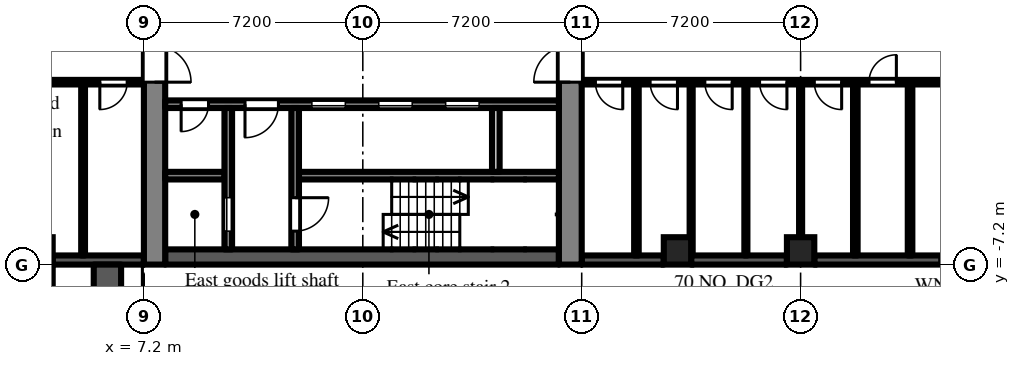
"""IFC4 building model, lengths in metres.
Left out: names, types, materials, properties, quantities, classifications, styles, units other than length and angle.
Written with IfcOpenShell. Run it as: python <this file> out.ifc"""

import sys

from ifc_helpers import new_model, si_unit, direction, frame, frame_2d, origin, origin_2d, place, context, subcontext, project, spatial, rectangle, extrude, element, fill, save


model = new_model("IFC4")
c1 = context("Model", 3, precision=1e-05, world=origin(), true_north=direction((0.0, 1.0)))
c2 = subcontext(c1, "Body", "Model", "MODEL_VIEW")
j1 = project(units=[si_unit("LENGTHUNIT", "METRE"), si_unit("PLANEANGLEUNIT", "RADIAN")], contexts=[c1])
p1 = place(None, origin())
s1 = spatial("IfcSite", under=j1, at=p1, CompositionType="ELEMENT")
p2 = place(p1, origin())
s2 = spatial("IfcBuilding", under=s1, at=p2, CompositionType="ELEMENT")
p3 = place(p2, frame((0.0, 0.0, 20.7)))
s3 = spatial("IfcBuildingStorey", under=s2, at=p3, CompositionType="ELEMENT", Elevation=20.7)
for number, where, z_axis, x_axis in (
    (1, (24.75, -6.75, 0.0), (0.0, 0.0, 1.0), (1.0, 0.0, 0.0)),
    (2, (28.8, -6.75, 0.0), (0.0, 0.0, 1.0), (1.0, 0.0, 0.0)),
):
    element("IfcColumn", number, at=place(p3, frame(where, z_axis=z_axis, x_axis=x_axis)), inside=s3, PredefinedType="COLUMN", context=c2, shape_type="SweptSolid", body=[
        extrude(rectangle(XDim=0.9, YDim=0.9, at=origin_2d()), origin(), (0.0, 0.0, 1.0), 3.0),
    ])
p4 = place(p3, frame((21.6, -7.05, 0.0), z_axis=(0.0, 0.0, 1.0), x_axis=(1.0, 0.0, 0.0)))
e3 = element("IfcWall", 3, at=p4, inside=s3, PredefinedType="SOLIDWALL", context=c2, shape_type="SweptSolid", body=[
    extrude(rectangle(XDim=2.7, YDim=0.3, at=frame_2d((1.35, 0.0))), origin(), (0.0, 0.0, 1.0), 2.1),
])
p5 = place(p3, frame((25.2, -7.05, 0.0), z_axis=(0.0, 0.0, 1.0), x_axis=(1.0, 0.0, 0.0)))
e4 = element("IfcWall", 4, at=p5, inside=s3, PredefinedType="SOLIDWALL", context=c2, shape_type="SweptSolid", body=[
    extrude(rectangle(XDim=3.15, YDim=0.3, at=frame_2d((1.575, 0.0))), origin(), (0.0, 0.0, 1.0), 2.1),
])
p6 = place(p3, frame((29.25, -7.05, 0.0), z_axis=(0.0, 0.0, 1.0), x_axis=(1.0, 0.0, 0.0)))
e5 = element("IfcWall", 5, at=p6, inside=s3, PredefinedType="SOLIDWALL", context=c2, shape_type="SweptSolid", body=[
    extrude(rectangle(XDim=6.3, YDim=0.3, at=frame_2d((3.15, 0.0))), origin(), (0.0, 0.0, 1.0), 2.1),
])
p7 = place(p6, frame((4.125, 0.0, 0.2)))
e6 = element("IfcOpeningElement", 6, at=p7, cuts=e5, PredefinedType="OPENING", context=c2, shape_type="SweptSolid", body=[
    extrude(rectangle(XDim=1.2, YDim=1.85, at=frame_2d((0.6, 0.925))), frame((0.0, 0.16, 0.0), z_axis=(0.0, -1.0, 0.0), x_axis=(1.0, 0.0, 0.0)), (0.0, 0.0, 1.0), 0.32),
])
p8 = place(p3, frame((4.05, -14.4, 0.0), z_axis=(0.0, 0.0, 1.0), x_axis=(0.0, 1.0, 0.0)))
e7 = element("IfcWall", 7, at=p8, inside=s3, PredefinedType="SOLIDWALL", context=c2, shape_type="SweptSolid", body=[
    extrude(rectangle(XDim=7.2, YDim=0.3, at=frame_2d((3.6, 0.0))), origin(), (0.0, 0.0, 1.0), 2.1),
])
p9 = place(p8, frame((3.0, 0.0, 0.0)))
e8 = element("IfcOpeningElement", 8, at=p9, cuts=e7, PredefinedType="OPENING", context=c2, shape_type="SweptSolid", body=[
    extrude(rectangle(XDim=1.2, YDim=2.05, at=frame_2d((0.6, 1.025))), frame((0.0, 0.16, 0.0), z_axis=(0.0, -1.0, 0.0), x_axis=(1.0, 0.0, 0.0)), (0.0, 0.0, 1.0), 0.32),
])
p10 = place(p8, frame((0.9, 0.0, 0.2)))
e9 = element("IfcOpeningElement", 9, at=p10, cuts=e7, PredefinedType="OPENING", context=c2, shape_type="SweptSolid", body=[
    extrude(rectangle(XDim=1.8, YDim=1.85, at=frame_2d((0.9, 0.925))), frame((0.0, 0.16, 0.0), z_axis=(0.0, -1.0, 0.0), x_axis=(1.0, 0.0, 0.0)), (0.0, 0.0, 1.0), 0.32),
])
p11 = place(p8, frame((4.5, 0.0, 0.2)))
e10 = element("IfcOpeningElement", 10, at=p11, cuts=e7, PredefinedType="OPENING", context=c2, shape_type="SweptSolid", body=[
    extrude(rectangle(XDim=1.8, YDim=1.85, at=frame_2d((0.9, 0.925))), frame((0.0, 0.16, 0.0), z_axis=(0.0, -1.0, 0.0), x_axis=(1.0, 0.0, 0.0)), (0.0, 0.0, 1.0), 0.32),
])
p12 = place(p3, frame((4.2, -7.05, 0.0), z_axis=(0.0, 0.0, 1.0), x_axis=(1.0, 0.0, 0.0)))
e11 = element("IfcWall", 11, at=p12, inside=s3, PredefinedType="SOLIDWALL", context=c2, shape_type="SweptSolid", body=[
    extrude(rectangle(XDim=3.0, YDim=0.3, at=frame_2d((1.5, 0.0))), origin(), (0.0, 0.0, 1.0), 2.1),
])
p13 = place(p3, frame((6.0, -14.4, 0.0), z_axis=(0.0, 0.0, 1.0), x_axis=(0.0, 1.0, 0.0)))
e12 = element("IfcWall", 12, at=p13, inside=s3, PredefinedType="PARAPET", context=c2, shape_type="SweptSolid", body=[
    extrude(rectangle(XDim=7.2, YDim=0.9, at=frame_2d((3.6, 0.0))), origin(), (0.0, 0.0, 1.0), 0.8),
])
p14 = place(p3, frame((7.55, -7.2, 0.0), z_axis=(0.0, 0.0, 1.0), x_axis=(0.0, 1.0, 0.0)))
e13 = element("IfcWall", 13, at=p14, inside=s3, PredefinedType="SHEAR", context=c2, shape_type="SweptSolid", body=[
    extrude(rectangle(XDim=14.4, YDim=0.7, at=frame_2d((7.2, 0.0))), origin(), (0.0, 0.0, 1.0), 2.575),
])
p15 = place(p14, frame((6.0, 0.0, 0.0)))
e14 = element("IfcOpeningElement", 14, at=p15, cuts=e13, PredefinedType="OPENING", context=c2, shape_type="SweptSolid", body=[
    extrude(rectangle(XDim=2.4, YDim=2.2, at=frame_2d((1.2, 1.1))), frame((0.0, 0.36, 0.0), z_axis=(0.0, -1.0, 0.0), x_axis=(1.0, 0.0, 0.0)), (0.0, 0.0, 1.0), 0.72),
])
p16 = place(p3, frame((21.225, -7.2, 0.0), z_axis=(0.0, 0.0, 1.0), x_axis=(0.0, 1.0, 0.0)))
e15 = element("IfcWall", 15, at=p16, inside=s3, PredefinedType="SHEAR", context=c2, shape_type="SweptSolid", body=[
    extrude(rectangle(XDim=14.4, YDim=0.75, at=frame_2d((7.2, 0.0))), origin(), (0.0, 0.0, 1.0), 2.575),
])
p17 = place(p16, frame((6.0, 0.0, 0.0)))
e16 = element("IfcOpeningElement", 16, at=p17, cuts=e15, PredefinedType="OPENING", context=c2, shape_type="SweptSolid", body=[
    extrude(rectangle(XDim=2.4, YDim=2.2, at=frame_2d((1.2, 1.1))), frame((0.0, 0.385, 0.0), z_axis=(0.0, -1.0, 0.0), x_axis=(1.0, 0.0, 0.0)), (0.0, 0.0, 1.0), 0.77),
])
p18 = place(p3, frame((7.9, -6.95, 0.0), z_axis=(0.0, 0.0, 1.0), x_axis=(1.0, 0.0, 0.0)))
e17 = element("IfcWall", 17, at=p18, inside=s3, PredefinedType="SHEAR", context=c2, shape_type="SweptSolid", body=[
    extrude(rectangle(XDim=12.95, YDim=0.5, at=frame_2d((6.475, 0.0))), origin(), (0.0, 0.0, 1.0), 2.575),
])
p19 = place(p3, frame((7.9, -1.925, 0.0), z_axis=(0.0, 0.0, 1.0), x_axis=(1.0, 0.0, 0.0)))
e18 = element("IfcWall", 18, at=p19, inside=s3, PredefinedType="SHEAR", context=c2, shape_type="SweptSolid", body=[
    extrude(rectangle(XDim=12.95, YDim=0.25, at=frame_2d((6.475, 0.0))), origin(), (0.0, 0.0, 1.0), 2.575),
])
p20 = place(p19, frame((4.825, 0.0, 0.0)))
e19 = element("IfcOpeningElement", 19, at=p20, cuts=e18, PredefinedType="OPENING", context=c2, shape_type="SweptSolid", body=[
    extrude(rectangle(XDim=1.1, YDim=2.1, at=frame_2d((0.55, 1.05))), frame((0.0, 0.135, 0.0), z_axis=(0.0, -1.0, 0.0), x_axis=(1.0, 0.0, 0.0)), (0.0, 0.0, 1.0), 0.27),
])
p21 = place(p19, frame((7.025, 0.0, 0.0)))
e20 = element("IfcOpeningElement", 20, at=p21, cuts=e18, PredefinedType="OPENING", context=c2, shape_type="SweptSolid", body=[
    extrude(rectangle(XDim=1.1, YDim=2.1, at=frame_2d((0.55, 1.05))), frame((0.0, 0.135, 0.0), z_axis=(0.0, -1.0, 0.0), x_axis=(1.0, 0.0, 0.0)), (0.0, 0.0, 1.0), 0.27),
])
p22 = place(p19, frame((9.225, 0.0, 0.0)))
e21 = element("IfcOpeningElement", 21, at=p22, cuts=e18, PredefinedType="OPENING", context=c2, shape_type="SweptSolid", body=[
    extrude(rectangle(XDim=1.1, YDim=2.1, at=frame_2d((0.55, 1.05))), frame((0.0, 0.135, 0.0), z_axis=(0.0, -1.0, 0.0), x_axis=(1.0, 0.0, 0.0)), (0.0, 0.0, 1.0), 0.27),
])
p23 = place(p19, frame((0.525, 0.0, 0.0)))
e22 = element("IfcOpeningElement", 22, at=p23, cuts=e18, PredefinedType="OPENING", context=c2, shape_type="SweptSolid", body=[
    extrude(rectangle(XDim=0.9, YDim=2.1, at=frame_2d((0.45, 1.05))), frame((0.0, 0.135, 0.0), z_axis=(0.0, -1.0, 0.0), x_axis=(1.0, 0.0, 0.0)), (0.0, 0.0, 1.0), 0.27),
])
p24 = place(p19, frame((2.625, 0.0, 0.0)))
e23 = element("IfcOpeningElement", 23, at=p24, cuts=e18, PredefinedType="OPENING", context=c2, shape_type="SweptSolid", body=[
    extrude(rectangle(XDim=1.1, YDim=2.1, at=frame_2d((0.55, 1.05))), frame((0.0, 0.135, 0.0), z_axis=(0.0, -1.0, 0.0), x_axis=(1.0, 0.0, 0.0)), (0.0, 0.0, 1.0), 0.27),
])
p25 = place(p3, frame((7.9, -4.275, 0.0), z_axis=(0.0, 0.0, 1.0), x_axis=(1.0, 0.0, 0.0)))
e24 = element("IfcWall", 24, at=p25, inside=s3, PredefinedType="SHEAR", context=c2, shape_type="SweptSolid", body=[
    extrude(rectangle(XDim=1.95, YDim=0.25, at=frame_2d((0.975, 0.0))), origin(), (0.0, 0.0, 1.0), 2.575),
])
p26 = place(p3, frame((12.3, -4.275, 0.0), z_axis=(0.0, 0.0, 1.0), x_axis=(1.0, 0.0, 0.0)))
e25 = element("IfcWall", 25, at=p26, inside=s3, PredefinedType="SHEAR", context=c2, shape_type="SweptSolid", body=[
    extrude(rectangle(XDim=8.55, YDim=0.25, at=frame_2d((4.275, 0.0))), origin(), (0.0, 0.0, 1.0), 2.575),
])
p27 = place(p3, frame((9.975, -2.05, 0.0), z_axis=(0.0, 0.0, 1.0), x_axis=(0.0, -1.0, 0.0)))
e26 = element("IfcWall", 26, at=p27, inside=s3, PredefinedType="SHEAR", context=c2, shape_type="SweptSolid", body=[
    extrude(rectangle(XDim=4.65, YDim=0.25, at=frame_2d((2.325, 0.0))), origin(), (0.0, 0.0, 1.0), 2.575),
])
p28 = place(p27, frame((2.95, 0.0, 0.0)))
e27 = element("IfcOpeningElement", 27, at=p28, cuts=e26, PredefinedType="OPENING", context=c2, shape_type="SweptSolid", body=[
    extrude(rectangle(XDim=1.1, YDim=2.1, at=frame_2d((0.55, 1.05))), frame((0.0, 0.135, 0.0), z_axis=(0.0, -1.0, 0.0), x_axis=(1.0, 0.0, 0.0)), (0.0, 0.0, 1.0), 0.27),
])
p29 = place(p3, frame((12.175, -2.05, 0.0), z_axis=(0.0, 0.0, 1.0), x_axis=(0.0, -1.0, 0.0)))
e28 = element("IfcWall", 28, at=p29, inside=s3, PredefinedType="SHEAR", context=c2, shape_type="SweptSolid", body=[
    extrude(rectangle(XDim=4.65, YDim=0.25, at=frame_2d((2.325, 0.0))), origin(), (0.0, 0.0, 1.0), 2.575),
])
p30 = place(p29, frame((2.95, 0.0, 0.0)))
e29 = element("IfcOpeningElement", 29, at=p30, cuts=e28, PredefinedType="OPENING", context=c2, shape_type="SweptSolid", body=[
    extrude(rectangle(XDim=1.1, YDim=2.1, at=frame_2d((0.55, 1.05))), frame((0.0, 0.135, 0.0), z_axis=(0.0, -1.0, 0.0), x_axis=(1.0, 0.0, 0.0)), (0.0, 0.0, 1.0), 0.27),
])
p31 = place(p3, frame((18.775, -2.05, 0.0), z_axis=(0.0, 0.0, 1.0), x_axis=(0.0, -1.0, 0.0)))
e30 = element("IfcWall", 30, at=p31, inside=s3, PredefinedType="PARTITIONING", context=c2, shape_type="SweptSolid", body=[
    extrude(rectangle(XDim=2.1, YDim=0.25, at=frame_2d((1.05, 0.0))), origin(), (0.0, 0.0, 1.0), 2.575),
])
p32 = place(p3, frame((1.275, -1.2, 0.0), z_axis=(0.0, 0.0, 1.0), x_axis=(1.0, 0.0, 0.0)))
e31 = element("IfcWall", 31, at=p32, inside=s3, PredefinedType="PARTITIONING", context=c2, shape_type="SweptSolid", body=[
    extrude(rectangle(XDim=5.925, YDim=0.15, at=frame_2d((2.962, 0.0))), origin(), (0.0, 0.0, 1.0), 2.575),
])
p33 = place(p32, frame((4.475, 0.0, 0.0)))
e32 = element("IfcOpeningElement", 32, at=p33, cuts=e31, PredefinedType="OPENING", context=c2, shape_type="SweptSolid", body=[
    extrude(rectangle(XDim=0.9, YDim=2.1, at=frame_2d((0.45, 1.05))), frame((0.0, 0.085, 0.0), z_axis=(0.0, -1.0, 0.0), x_axis=(1.0, 0.0, 0.0)), (0.0, 0.0, 1.0), 0.17),
])
p34 = place(p3, frame((5.2, -6.9, 0.0), z_axis=(0.0, 0.0, 1.0), x_axis=(0.0, 1.0, 0.0)))
e33 = element("IfcWall", 33, at=p34, inside=s3, PredefinedType="PARTITIONING", context=c2, shape_type="SweptSolid", body=[
    extrude(rectangle(XDim=5.625, YDim=0.125, at=frame_2d((2.812, 0.0))), origin(), (0.0, 0.0, 1.0), 2.575),
])
p35 = place(p3, frame((21.6, -1.2, 0.0), z_axis=(0.0, 0.0, 1.0), x_axis=(1.0, 0.0, 0.0)))
e34 = element("IfcWall", 34, at=p35, inside=s3, PredefinedType="PARTITIONING", context=c2, shape_type="SweptSolid", body=[
    extrude(rectangle(XDim=14.9, YDim=0.15, at=frame_2d((7.45, 0.0))), origin(), (0.0, 0.0, 1.0), 2.575),
])
p36 = place(p35, frame((0.45, 0.0, 0.0)))
e35 = element("IfcOpeningElement", 35, at=p36, cuts=e34, PredefinedType="OPENING", context=c2, shape_type="SweptSolid", body=[
    extrude(rectangle(XDim=0.9, YDim=2.1, at=frame_2d((0.45, 1.05))), frame((0.0, 0.085, 0.0), z_axis=(0.0, -1.0, 0.0), x_axis=(1.0, 0.0, 0.0)), (0.0, 0.0, 1.0), 0.17),
])
p37 = place(p35, frame((2.25, 0.0, 0.0)))
e36 = element("IfcOpeningElement", 36, at=p37, cuts=e34, PredefinedType="OPENING", context=c2, shape_type="SweptSolid", body=[
    extrude(rectangle(XDim=0.9, YDim=2.1, at=frame_2d((0.45, 1.05))), frame((0.0, 0.085, 0.0), z_axis=(0.0, -1.0, 0.0), x_axis=(1.0, 0.0, 0.0)), (0.0, 0.0, 1.0), 0.17),
])
p38 = place(p35, frame((4.05, 0.0, 0.0)))
e37 = element("IfcOpeningElement", 37, at=p38, cuts=e34, PredefinedType="OPENING", context=c2, shape_type="SweptSolid", body=[
    extrude(rectangle(XDim=0.9, YDim=2.1, at=frame_2d((0.45, 1.05))), frame((0.0, 0.085, 0.0), z_axis=(0.0, -1.0, 0.0), x_axis=(1.0, 0.0, 0.0)), (0.0, 0.0, 1.0), 0.17),
])
p39 = place(p35, frame((5.85, 0.0, 0.0)))
e38 = element("IfcOpeningElement", 38, at=p39, cuts=e34, PredefinedType="OPENING", context=c2, shape_type="SweptSolid", body=[
    extrude(rectangle(XDim=0.9, YDim=2.1, at=frame_2d((0.45, 1.05))), frame((0.0, 0.085, 0.0), z_axis=(0.0, -1.0, 0.0), x_axis=(1.0, 0.0, 0.0)), (0.0, 0.0, 1.0), 0.17),
])
p40 = place(p35, frame((7.65, 0.0, 0.0)))
e39 = element("IfcOpeningElement", 39, at=p40, cuts=e34, PredefinedType="OPENING", context=c2, shape_type="SweptSolid", body=[
    extrude(rectangle(XDim=0.9, YDim=2.1, at=frame_2d((0.45, 1.05))), frame((0.0, 0.085, 0.0), z_axis=(0.0, -1.0, 0.0), x_axis=(1.0, 0.0, 0.0)), (0.0, 0.0, 1.0), 0.17),
])
p41 = place(p35, frame((9.45, 0.0, 0.0)))
e40 = element("IfcOpeningElement", 40, at=p41, cuts=e34, PredefinedType="OPENING", context=c2, shape_type="SweptSolid", body=[
    extrude(rectangle(XDim=0.9, YDim=2.1, at=frame_2d((0.45, 1.05))), frame((0.0, 0.085, 0.0), z_axis=(0.0, -1.0, 0.0), x_axis=(1.0, 0.0, 0.0)), (0.0, 0.0, 1.0), 0.17),
])
p42 = place(p35, frame((11.95, 0.0, 0.0)))
e41 = element("IfcOpeningElement", 41, at=p42, cuts=e34, PredefinedType="OPENING", context=c2, shape_type="SweptSolid", body=[
    extrude(rectangle(XDim=1.8, YDim=2.1, at=frame_2d((0.9, 1.05))), frame((0.0, 0.085, 0.0), z_axis=(0.0, -1.0, 0.0), x_axis=(1.0, 0.0, 0.0)), (0.0, 0.0, 1.0), 0.17),
])
p43 = place(p3, frame((23.4, -6.9, 0.0), z_axis=(0.0, 0.0, 1.0), x_axis=(0.0, 1.0, 0.0)))
e42 = element("IfcWall", 42, at=p43, inside=s3, PredefinedType="PARTITIONING", context=c2, shape_type="SweptSolid", body=[
    extrude(rectangle(XDim=5.625, YDim=0.15, at=frame_2d((2.812, 0.0))), origin(), (0.0, 0.0, 1.0), 2.575),
])
for number, where, z_axis, x_axis in (
    (43, (25.2, -6.9, 0.0), (0.0, 0.0, 1.0), (0.0, 1.0, 0.0)),
    (44, (27.0, -6.9, 0.0), (0.0, 0.0, 1.0), (0.0, 1.0, 0.0)),
    (45, (28.8, -6.9, 0.0), (0.0, 0.0, 1.0), (0.0, 1.0, 0.0)),
):
    element("IfcWall", number, at=place(p3, frame(where, z_axis=z_axis, x_axis=x_axis)), inside=s3, PredefinedType="PARTITIONING", context=c2, shape_type="SweptSolid", body=[
        extrude(rectangle(XDim=5.625, YDim=0.1, at=frame_2d((2.812, 0.0))), origin(), (0.0, 0.0, 1.0), 2.575),
    ])
for number, where, z_axis, x_axis in (
    (46, (30.6, -6.9, 0.0), (0.0, 0.0, 1.0), (0.0, 1.0, 0.0)),
    (47, (32.4, -6.9, 0.0), (0.0, 0.0, 1.0), (0.0, 1.0, 0.0)),
):
    element("IfcWall", number, at=place(p3, frame(where, z_axis=z_axis, x_axis=x_axis)), inside=s3, PredefinedType="PARTITIONING", context=c2, shape_type="SweptSolid", body=[
        extrude(rectangle(XDim=5.625, YDim=0.15, at=frame_2d((2.812, 0.0))), origin(), (0.0, 0.0, 1.0), 2.575),
    ])
p44 = place(p7, origin())
e48 = element("IfcWindow", 48, at=p44, inside=s3, PartitioningType="SINGLE_PANEL", PredefinedType="WINDOW", context=c2, shape_type="SweptSolid", body=[
    extrude(rectangle(XDim=1.2, YDim=1.85, at=frame_2d((0.6, 0.925))), frame((0.0, 0.03, 0.0), z_axis=(0.0, -1.0, 0.0), x_axis=(1.0, 0.0, 0.0)), (0.0, 0.0, 1.0), 0.06),
])
fill(e6, e48)
p45 = place(p20, origin())
e49 = element("IfcDoor", 49, at=p45, inside=s3, OperationType="SLIDING_TO_LEFT", PredefinedType="DOOR", context=c2, shape_type="SweptSolid", body=[
    extrude(rectangle(XDim=1.1, YDim=2.1, at=frame_2d((0.55, 1.05))), frame((0.0, 0.025, 0.0), z_axis=(0.0, -1.0, 0.0), x_axis=(1.0, 0.0, 0.0)), (0.0, 0.0, 1.0), 0.05),
])
fill(e19, e49)
p46 = place(p21, origin())
e50 = element("IfcDoor", 50, at=p46, inside=s3, OperationType="SLIDING_TO_LEFT", PredefinedType="DOOR", context=c2, shape_type="SweptSolid", body=[
    extrude(rectangle(XDim=1.1, YDim=2.1, at=frame_2d((0.55, 1.05))), frame((0.0, 0.025, 0.0), z_axis=(0.0, -1.0, 0.0), x_axis=(1.0, 0.0, 0.0)), (0.0, 0.0, 1.0), 0.05),
])
fill(e20, e50)
p47 = place(p22, origin())
e51 = element("IfcDoor", 51, at=p47, inside=s3, OperationType="SLIDING_TO_LEFT", PredefinedType="DOOR", context=c2, shape_type="SweptSolid", body=[
    extrude(rectangle(XDim=1.1, YDim=2.1, at=frame_2d((0.55, 1.05))), frame((0.0, 0.025, 0.0), z_axis=(0.0, -1.0, 0.0), x_axis=(1.0, 0.0, 0.0)), (0.0, 0.0, 1.0), 0.05),
])
fill(e21, e51)
p48 = place(p28, origin())
e52 = element("IfcDoor", 52, at=p48, inside=s3, OperationType="SLIDING_TO_LEFT", PredefinedType="DOOR", context=c2, shape_type="SweptSolid", body=[
    extrude(rectangle(XDim=1.1, YDim=2.1, at=frame_2d((0.55, 1.05))), frame((0.0, 0.025, 0.0), z_axis=(0.0, -1.0, 0.0), x_axis=(1.0, 0.0, 0.0)), (0.0, 0.0, 1.0), 0.05),
])
fill(e27, e52)
p49 = place(p30, origin())
e53 = element("IfcDoor", 53, at=p49, inside=s3, OperationType="SINGLE_SWING_LEFT", PredefinedType="DOOR", context=c2, shape_type="SweptSolid", body=[
    extrude(rectangle(XDim=1.1, YDim=2.1, at=frame_2d((0.55, 1.05))), frame((0.0, 0.025, 0.0), z_axis=(0.0, -1.0, 0.0), x_axis=(1.0, 0.0, 0.0)), (0.0, 0.0, 1.0), 0.05),
])
fill(e29, e53)
p50 = place(p23, frame((0.9, 0.0, 0.0), z_axis=(0.0, 0.0, 1.0), x_axis=(-1.0, 0.0, 0.0)))
e54 = element("IfcDoor", 54, at=p50, inside=s3, OperationType="SINGLE_SWING_RIGHT", PredefinedType="DOOR", context=c2, shape_type="SweptSolid", body=[
    extrude(rectangle(XDim=0.9, YDim=2.1, at=frame_2d((0.45, 1.05))), frame((0.0, 0.025, 0.0), z_axis=(0.0, -1.0, 0.0), x_axis=(1.0, 0.0, 0.0)), (0.0, 0.0, 1.0), 0.05),
])
fill(e22, e54)
p51 = place(p24, frame((1.1, 0.0, 0.0), z_axis=(0.0, 0.0, 1.0), x_axis=(-1.0, 0.0, 0.0)))
e55 = element("IfcDoor", 55, at=p51, inside=s3, OperationType="SINGLE_SWING_RIGHT", PredefinedType="DOOR", context=c2, shape_type="SweptSolid", body=[
    extrude(rectangle(XDim=1.1, YDim=2.1, at=frame_2d((0.55, 1.05))), frame((0.0, 0.025, 0.0), z_axis=(0.0, -1.0, 0.0), x_axis=(1.0, 0.0, 0.0)), (0.0, 0.0, 1.0), 0.05),
])
fill(e23, e55)
p52 = place(p15, frame((2.4, 0.0, 0.0), z_axis=(0.0, 0.0, 1.0), x_axis=(-1.0, 0.0, 0.0)))
e56 = element("IfcDoor", 56, at=p52, inside=s3, OperationType="DOUBLE_DOOR_DOUBLE_SWING", PredefinedType="DOOR", context=c2, shape_type="SweptSolid", body=[
    extrude(rectangle(XDim=2.4, YDim=2.2, at=frame_2d((1.2, 1.1))), frame((0.0, 0.025, 0.0), z_axis=(0.0, -1.0, 0.0), x_axis=(1.0, 0.0, 0.0)), (0.0, 0.0, 1.0), 0.05),
])
fill(e14, e56)
p53 = place(p17, origin())
e57 = element("IfcDoor", 57, at=p53, inside=s3, OperationType="DOUBLE_DOOR_DOUBLE_SWING", PredefinedType="DOOR", context=c2, shape_type="SweptSolid", body=[
    extrude(rectangle(XDim=2.4, YDim=2.2, at=frame_2d((1.2, 1.1))), frame((0.0, 0.025, 0.0), z_axis=(0.0, -1.0, 0.0), x_axis=(1.0, 0.0, 0.0)), (0.0, 0.0, 1.0), 0.05),
])
fill(e16, e57)
p54 = place(p33, frame((0.9, 0.0, 0.0), z_axis=(0.0, 0.0, 1.0), x_axis=(-1.0, 0.0, 0.0)))
e58 = element("IfcDoor", 58, at=p54, inside=s3, OperationType="SINGLE_SWING_RIGHT", PredefinedType="DOOR", context=c2, shape_type="SweptSolid", body=[
    extrude(rectangle(XDim=0.9, YDim=2.1, at=frame_2d((0.45, 1.05))), frame((0.0, 0.025, 0.0), z_axis=(0.0, -1.0, 0.0), x_axis=(1.0, 0.0, 0.0)), (0.0, 0.0, 1.0), 0.05),
])
fill(e32, e58)
p55 = place(p36, frame((0.9, 0.0, 0.0), z_axis=(0.0, 0.0, 1.0), x_axis=(-1.0, 0.0, 0.0)))
e59 = element("IfcDoor", 59, at=p55, inside=s3, OperationType="SINGLE_SWING_LEFT", PredefinedType="DOOR", context=c2, shape_type="SweptSolid", body=[
    extrude(rectangle(XDim=0.9, YDim=2.1, at=frame_2d((0.45, 1.05))), frame((0.0, 0.025, 0.0), z_axis=(0.0, -1.0, 0.0), x_axis=(1.0, 0.0, 0.0)), (0.0, 0.0, 1.0), 0.05),
])
fill(e35, e59)
p56 = place(p37, frame((0.9, 0.0, 0.0), z_axis=(0.0, 0.0, 1.0), x_axis=(-1.0, 0.0, 0.0)))
e60 = element("IfcDoor", 60, at=p56, inside=s3, OperationType="SINGLE_SWING_LEFT", PredefinedType="DOOR", context=c2, shape_type="SweptSolid", body=[
    extrude(rectangle(XDim=0.9, YDim=2.1, at=frame_2d((0.45, 1.05))), frame((0.0, 0.025, 0.0), z_axis=(0.0, -1.0, 0.0), x_axis=(1.0, 0.0, 0.0)), (0.0, 0.0, 1.0), 0.05),
])
fill(e36, e60)
p57 = place(p38, frame((0.9, 0.0, 0.0), z_axis=(0.0, 0.0, 1.0), x_axis=(-1.0, 0.0, 0.0)))
e61 = element("IfcDoor", 61, at=p57, inside=s3, OperationType="SINGLE_SWING_LEFT", PredefinedType="DOOR", context=c2, shape_type="SweptSolid", body=[
    extrude(rectangle(XDim=0.9, YDim=2.1, at=frame_2d((0.45, 1.05))), frame((0.0, 0.025, 0.0), z_axis=(0.0, -1.0, 0.0), x_axis=(1.0, 0.0, 0.0)), (0.0, 0.0, 1.0), 0.05),
])
fill(e37, e61)
p58 = place(p39, frame((0.9, 0.0, 0.0), z_axis=(0.0, 0.0, 1.0), x_axis=(-1.0, 0.0, 0.0)))
e62 = element("IfcDoor", 62, at=p58, inside=s3, OperationType="SINGLE_SWING_LEFT", PredefinedType="DOOR", context=c2, shape_type="SweptSolid", body=[
    extrude(rectangle(XDim=0.9, YDim=2.1, at=frame_2d((0.45, 1.05))), frame((0.0, 0.025, 0.0), z_axis=(0.0, -1.0, 0.0), x_axis=(1.0, 0.0, 0.0)), (0.0, 0.0, 1.0), 0.05),
])
fill(e38, e62)
p59 = place(p40, frame((0.9, 0.0, 0.0), z_axis=(0.0, 0.0, 1.0), x_axis=(-1.0, 0.0, 0.0)))
e63 = element("IfcDoor", 63, at=p59, inside=s3, OperationType="SINGLE_SWING_LEFT", PredefinedType="DOOR", context=c2, shape_type="SweptSolid", body=[
    extrude(rectangle(XDim=0.9, YDim=2.1, at=frame_2d((0.45, 1.05))), frame((0.0, 0.025, 0.0), z_axis=(0.0, -1.0, 0.0), x_axis=(1.0, 0.0, 0.0)), (0.0, 0.0, 1.0), 0.05),
])
fill(e39, e63)
p60 = place(p41, origin())
e64 = element("IfcDoor", 64, at=p60, inside=s3, OperationType="SINGLE_SWING_RIGHT", PredefinedType="DOOR", context=c2, shape_type="SweptSolid", body=[
    extrude(rectangle(XDim=0.9, YDim=2.1, at=frame_2d((0.45, 1.05))), frame((0.0, 0.025, 0.0), z_axis=(0.0, -1.0, 0.0), x_axis=(1.0, 0.0, 0.0)), (0.0, 0.0, 1.0), 0.05),
])
fill(e40, e64)
save(model, sys.argv[1])
